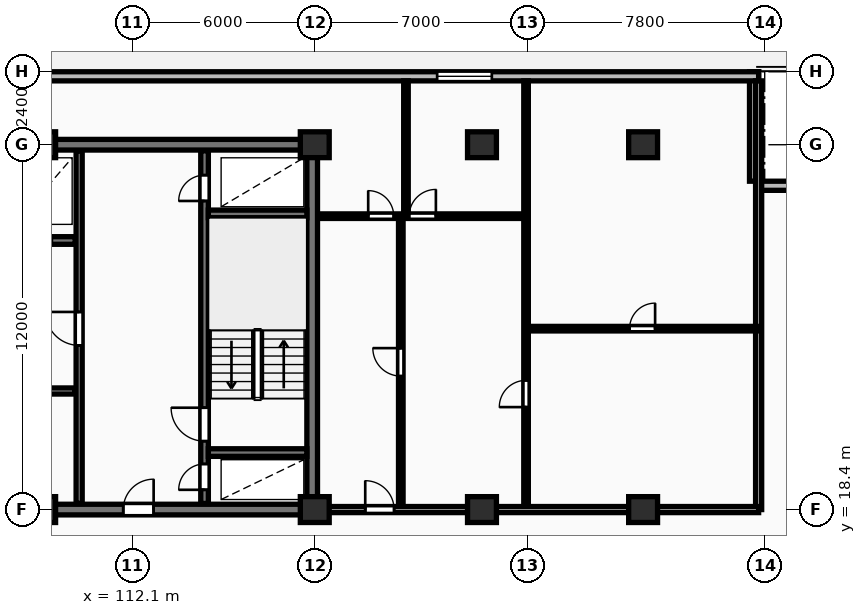
"""IFC4 building model, lengths in metres.
Left out: names, types, materials, properties, quantities, classifications, styles, units other than length and angle.
Written with IfcOpenShell. Run it as: python <this file> out.ifc"""

import sys

from ifc_helpers import new_model, si_unit, direction, frame, frame_2d, origin, origin_2d, place, context, subcontext, project, spatial, rectangle, extrude, element, fill, save


model = new_model("IFC4")
c1 = context("Model", 3, precision=1e-05, world=origin(), true_north=direction((0.0, 1.0)))
c2 = subcontext(c1, "Body", "Model", "MODEL_VIEW")
j1 = project(units=[si_unit("LENGTHUNIT", "METRE"), si_unit("PLANEANGLEUNIT", "RADIAN")], contexts=[c1])
p1 = place(None, origin())
s1 = spatial("IfcSite", under=j1, at=p1, CompositionType="ELEMENT")
p2 = place(p1, origin())
s2 = spatial("IfcBuilding", under=s1, at=p2, CompositionType="ELEMENT")
p3 = place(p2, frame((0.0, 0.0, 24.0)))
s3 = spatial("IfcBuildingStorey", under=s2, at=p3, CompositionType="ELEMENT", Elevation=24.0)
for number, where, z_axis, x_axis in (
    (1, (109.1, 18.4, 0.0), (0.0, 0.0, 1.0), (1.0, 0.0, 0.0)),
    (2, (109.1, 30.4, 0.0), (0.0, 0.0, 1.0), (1.0, 0.0, 0.0)),
    (3, (118.1, 18.4, 0.0), (0.0, 0.0, 1.0), (1.0, 0.0, 0.0)),
    (4, (118.1, 30.4, 0.0), (0.0, 0.0, 1.0), (1.0, 0.0, 0.0)),
    (5, (123.6, 18.4, 0.0), (0.0, 0.0, 1.0), (1.0, 0.0, 0.0)),
    (6, (123.6, 30.4, 0.0), (0.0, 0.0, 1.0), (1.0, 0.0, 0.0)),
    (7, (128.9, 18.4, 0.0), (0.0, 0.0, 1.0), (1.0, 0.0, 0.0)),
    (8, (128.9, 30.4, 0.0), (0.0, 0.0, 1.0), (1.0, 0.0, 0.0)),
):
    element("IfcColumn", number, at=place(p3, frame(where, z_axis=z_axis, x_axis=x_axis)), inside=s3, PredefinedType="COLUMN", context=c2, shape_type="SweptSolid", body=[
        extrude(rectangle(XDim=0.95, YDim=0.85, at=origin_2d()), origin(), (0.0, 0.0, 1.0), 3.25),
    ])
for number, where, z_axis, x_axis in (
    (9, (136.3, 29.05, 0.0), (0.0, 0.0, 1.0), (-1.0, 0.0, 0.0)),
    (10, (132.55, 29.2, 0.0), (0.0, 0.0, 1.0), (0.0, 1.0, 0.0)),
):
    element("IfcWall", number, at=place(p3, frame(where, z_axis=z_axis, x_axis=x_axis)), inside=s3, PredefinedType="STANDARD", context=c2, shape_type="SweptSolid", body=[
        extrude(rectangle(XDim=3.6, YDim=0.3, at=frame_2d((1.8, 0.0))), origin(), (0.0, 0.0, 1.0), 2.97),
    ])
p4 = place(p3, frame((132.7, 32.65, 0.0), z_axis=(0.0, 0.0, 1.0), x_axis=(-1.0, 0.0, 0.0)))
e11 = element("IfcWall", 11, at=p4, inside=s3, PredefinedType="STANDARD", context=c2, shape_type="SweptSolid", body=[
    extrude(rectangle(XDim=62.0, YDim=0.3, at=frame_2d((31.0, 0.0))), origin(), (0.0, 0.0, 1.0), 2.97),
])
p5 = place(p4, frame((52.125, 0.0, 0.85)))
e12 = element("IfcOpeningElement", 12, at=p5, cuts=e11, PredefinedType="OPENING", context=c2, shape_type="SweptSolid", body=[
    extrude(rectangle(XDim=1.8, YDim=1.8, at=frame_2d((0.9, 0.9))), frame((0.0, 0.16, 0.0), z_axis=(0.0, -1.0, 0.0), x_axis=(1.0, 0.0, 0.0)), (0.0, 0.0, 1.0), 0.32),
])
p6 = place(p4, frame((8.775, 0.0, 0.85)))
e13 = element("IfcOpeningElement", 13, at=p6, cuts=e11, PredefinedType="OPENING", context=c2, shape_type="SweptSolid", body=[
    extrude(rectangle(XDim=1.8, YDim=1.8, at=frame_2d((0.9, 0.9))), frame((0.0, 0.16, 0.0), z_axis=(0.0, -1.0, 0.0), x_axis=(1.0, 0.0, 0.0)), (0.0, 0.0, 1.0), 0.32),
])
p7 = place(p3, frame((81.925, 30.4, 0.0), z_axis=(0.0, 0.0, 1.0), x_axis=(1.0, 0.0, 0.0)))
e14 = element("IfcWall", 14, at=p7, inside=s3, PredefinedType="SHEAR", context=c2, shape_type="SweptSolid", body=[
    extrude(rectangle(XDim=36.265, YDim=0.35, at=frame_2d((18.132, 0.0))), origin(), (0.0, 0.0, 1.0), 3.25),
])
p8 = place(p3, frame((118.015, 18.575, 0.0), z_axis=(0.0, 0.0, 1.0), x_axis=(0.0, 1.0, 0.0)))
e15 = element("IfcWall", 15, at=p8, inside=s3, PredefinedType="SHEAR", context=c2, shape_type="SweptSolid", body=[
    extrude(rectangle(XDim=11.65, YDim=0.35, at=frame_2d((5.825, 0.0))), origin(), (0.0, 0.0, 1.0), 3.25),
])
p9 = place(p3, frame((81.925, 18.4, 0.0), z_axis=(0.0, 0.0, 1.0), x_axis=(1.0, 0.0, 0.0)))
e16 = element("IfcWall", 16, at=p9, inside=s3, PredefinedType="SHEAR", context=c2, shape_type="SweptSolid", body=[
    extrude(rectangle(XDim=36.265, YDim=0.35, at=frame_2d((18.132, 0.0))), origin(), (0.0, 0.0, 1.0), 3.25),
])
p10 = place(p9, frame((5.675, 0.0, 0.0)))
e17 = element("IfcOpeningElement", 17, at=p10, cuts=e16, PredefinedType="OPENING", context=c2, shape_type="SweptSolid", body=[
    extrude(rectangle(XDim=1.0, YDim=2.15, at=frame_2d((0.5, 1.075))), frame((0.0, 0.185, 0.0), z_axis=(0.0, -1.0, 0.0), x_axis=(1.0, 0.0, 0.0)), (0.0, 0.0, 1.0), 0.37),
])
p11 = place(p9, frame((21.925, 0.0, 0.0)))
e18 = element("IfcOpeningElement", 18, at=p11, cuts=e16, PredefinedType="OPENING", context=c2, shape_type="SweptSolid", body=[
    extrude(rectangle(XDim=1.5, YDim=2.2, at=frame_2d((0.75, 1.1))), frame((0.0, 0.185, 0.0), z_axis=(0.0, -1.0, 0.0), x_axis=(1.0, 0.0, 0.0)), (0.0, 0.0, 1.0), 0.37),
])
p12 = place(p9, frame((29.875, 0.0, 0.0)))
e19 = element("IfcOpeningElement", 19, at=p12, cuts=e16, PredefinedType="OPENING", context=c2, shape_type="SweptSolid", body=[
    extrude(rectangle(XDim=1.0, YDim=2.15, at=frame_2d((0.5, 1.075))), frame((0.0, 0.185, 0.0), z_axis=(0.0, -1.0, 0.0), x_axis=(1.0, 0.0, 0.0)), (0.0, 0.0, 1.0), 0.37),
])
p13 = place(p3, frame((99.68, 27.25, 0.0), z_axis=(0.0, 0.0, 1.0), x_axis=(1.0, 0.0, 0.0)))
e20 = element("IfcWall", 20, at=p13, inside=s3, PredefinedType="SHEAR", context=c2, shape_type="SweptSolid", body=[
    extrude(rectangle(XDim=10.54, YDim=0.25, at=frame_2d((5.27, 0.0))), origin(), (0.0, 0.0, 1.0), 3.25),
])
p14 = place(p13, frame((8.92, 0.0, 0.0)))
e21 = element("IfcOpeningElement", 21, at=p14, cuts=e20, PredefinedType="OPENING", context=c2, shape_type="SweptSolid", body=[
    extrude(rectangle(XDim=0.85, YDim=2.05, at=frame_2d((0.425, 1.025))), frame((0.0, 0.135, 0.0), z_axis=(0.0, -1.0, 0.0), x_axis=(1.0, 0.0, 0.0)), (0.0, 0.0, 1.0), 0.27),
])
p15 = place(p3, frame((91.08, 22.3, 0.0), z_axis=(0.0, 0.0, 1.0), x_axis=(1.0, 0.0, 0.0)))
e22 = element("IfcWall", 22, at=p15, inside=s3, PredefinedType="PARTITIONING", context=c2, shape_type="SweptSolid", body=[
    extrude(rectangle(XDim=19.14, YDim=0.2, at=frame_2d((9.57, 0.0))), origin(), (0.0, 0.0, 1.0), 2.97),
])
p16 = place(p15, frame((1.15, 0.0, 0.0)))
e23 = element("IfcOpeningElement", 23, at=p16, cuts=e22, PredefinedType="OPENING", context=c2, shape_type="SweptSolid", body=[
    extrude(rectangle(XDim=0.85, YDim=2.05, at=frame_2d((0.425, 1.025))), frame((0.0, 0.11, 0.0), z_axis=(0.0, -1.0, 0.0), x_axis=(1.0, 0.0, 0.0)), (0.0, 0.0, 1.0), 0.22),
])
p17 = place(p15, frame((3.2, 0.0, 0.0)))
e24 = element("IfcOpeningElement", 24, at=p17, cuts=e22, PredefinedType="OPENING", context=c2, shape_type="SweptSolid", body=[
    extrude(rectangle(XDim=0.85, YDim=2.05, at=frame_2d((0.425, 1.025))), frame((0.0, 0.11, 0.0), z_axis=(0.0, -1.0, 0.0), x_axis=(1.0, 0.0, 0.0)), (0.0, 0.0, 1.0), 0.22),
])
p18 = place(p15, frame((12.72, 0.0, 0.0)))
e25 = element("IfcOpeningElement", 25, at=p18, cuts=e22, PredefinedType="OPENING", context=c2, shape_type="SweptSolid", body=[
    extrude(rectangle(XDim=1.5, YDim=2.2, at=frame_2d((0.75, 1.1))), frame((0.0, 0.11, 0.0), z_axis=(0.0, -1.0, 0.0), x_axis=(1.0, 0.0, 0.0)), (0.0, 0.0, 1.0), 0.22),
])
p19 = place(p15, frame((6.42, 0.0, 0.0)))
e26 = element("IfcOpeningElement", 26, at=p19, cuts=e22, PredefinedType="OPENING", context=c2, shape_type="SweptSolid", body=[
    extrude(rectangle(XDim=0.92, YDim=2.08, at=frame_2d((0.46, 1.04))), frame((0.0, 0.11, 0.0), z_axis=(0.0, -1.0, 0.0), x_axis=(1.0, 0.0, 0.0)), (0.0, 0.0, 1.0), 0.22),
])
p20 = place(p15, frame((15.87, 0.0, 0.0)))
e27 = element("IfcOpeningElement", 27, at=p20, cuts=e22, PredefinedType="OPENING", context=c2, shape_type="SweptSolid", body=[
    extrude(rectangle(XDim=0.92, YDim=2.08, at=frame_2d((0.46, 1.04))), frame((0.0, 0.11, 0.0), z_axis=(0.0, -1.0, 0.0), x_axis=(1.0, 0.0, 0.0)), (0.0, 0.0, 1.0), 0.22),
])
p21 = place(p3, frame((110.35, 18.6, 0.0), z_axis=(0.0, 0.0, 1.0), x_axis=(0.0, 1.0, 0.0)))
e28 = element("IfcWall", 28, at=p21, inside=s3, PredefinedType="PARTITIONING", context=c2, shape_type="SweptSolid", body=[
    extrude(rectangle(XDim=11.6, YDim=0.2, at=frame_2d((5.8, 0.0))), origin(), (0.0, 0.0, 1.0), 2.97),
])
p22 = place(p21, frame((5.2, 0.0, 0.0)))
e29 = element("IfcOpeningElement", 29, at=p22, cuts=e28, PredefinedType="OPENING", context=c2, shape_type="SweptSolid", body=[
    extrude(rectangle(XDim=1.1, YDim=2.15, at=frame_2d((0.55, 1.075))), frame((0.0, 0.11, 0.0), z_axis=(0.0, -1.0, 0.0), x_axis=(1.0, 0.0, 0.0)), (0.0, 0.0, 1.0), 0.22),
])
p23 = place(p3, frame((114.475, 18.6, 0.0), z_axis=(0.0, 0.0, 1.0), x_axis=(0.0, 1.0, 0.0)))
e30 = element("IfcWall", 30, at=p23, inside=s3, PredefinedType="SHEAR", context=c2, shape_type="SweptSolid", body=[
    extrude(rectangle(XDim=11.6, YDim=0.25, at=frame_2d((5.8, 0.0))), origin(), (0.0, 0.0, 1.0), 3.25),
])
p24 = place(p23, frame((0.45, 0.0, 0.0)))
e31 = element("IfcOpeningElement", 31, at=p24, cuts=e30, PredefinedType="OPENING", context=c2, shape_type="SweptSolid", body=[
    extrude(rectangle(XDim=0.85, YDim=2.05, at=frame_2d((0.425, 1.025))), frame((0.0, 0.135, 0.0), z_axis=(0.0, -1.0, 0.0), x_axis=(1.0, 0.0, 0.0)), (0.0, 0.0, 1.0), 0.27),
])
p25 = place(p23, frame((2.05, 0.0, 0.0)))
e32 = element("IfcOpeningElement", 32, at=p25, cuts=e30, PredefinedType="OPENING", context=c2, shape_type="SweptSolid", body=[
    extrude(rectangle(XDim=1.1, YDim=2.1, at=frame_2d((0.55, 1.05))), frame((0.0, 0.135, 0.0), z_axis=(0.0, -1.0, 0.0), x_axis=(1.0, 0.0, 0.0)), (0.0, 0.0, 1.0), 0.27),
])
p26 = place(p23, frame((9.95, 0.0, 0.0)))
e33 = element("IfcOpeningElement", 33, at=p26, cuts=e30, PredefinedType="OPENING", context=c2, shape_type="SweptSolid", body=[
    extrude(rectangle(XDim=0.85, YDim=2.05, at=frame_2d((0.425, 1.025))), frame((0.0, 0.135, 0.0), z_axis=(0.0, -1.0, 0.0), x_axis=(1.0, 0.0, 0.0)), (0.0, 0.0, 1.0), 0.27),
])
for number, where, z_axis, x_axis in (
    (34, (114.6, 20.275, 0.0), (0.0, 0.0, 1.0), (1.0, 0.0, 0.0)),
    (35, (114.6, 28.125, 0.0), (0.0, 0.0, 1.0), (1.0, 0.0, 0.0)),
):
    element("IfcWall", number, at=place(p3, frame(where, z_axis=z_axis, x_axis=x_axis)), inside=s3, PredefinedType="SHEAR", context=c2, shape_type="SweptSolid", body=[
        extrude(rectangle(XDim=3.24, YDim=0.25, at=frame_2d((1.62, 0.0))), origin(), (0.0, 0.0, 1.0), 3.25),
    ])
p27 = place(p3, frame((132.7, 18.4, 0.0), z_axis=(0.0, 0.0, 1.0), x_axis=(0.0, 1.0, 0.0)))
e36 = element("IfcWall", 36, at=p27, inside=s3, PredefinedType="PARTITIONING", context=c2, shape_type="SweptSolid", body=[
    extrude(rectangle(XDim=14.1, YDim=0.2, at=frame_2d((7.05, 0.0))), origin(), (0.0, 0.0, 1.0), 2.97),
])
p28 = place(p3, frame((125.05, 24.35, 0.0), z_axis=(0.0, 0.0, 1.0), x_axis=(1.0, 0.0, 0.0)))
e37 = element("IfcWall", 37, at=p28, inside=s3, PredefinedType="PARTITIONING", context=c2, shape_type="SweptSolid", body=[
    extrude(rectangle(XDim=7.65, YDim=0.15, at=frame_2d((3.825, 0.0))), origin(), (0.0, 0.0, 1.0), 2.97),
])
p29 = place(p28, frame((3.405, 0.0, 0.0)))
e38 = element("IfcOpeningElement", 38, at=p29, cuts=e37, PredefinedType="OPENING", context=c2, shape_type="SweptSolid", body=[
    extrude(rectangle(XDim=0.84, YDim=2.04, at=frame_2d((0.42, 1.02))), frame((0.0, 0.085, 0.0), z_axis=(0.0, -1.0, 0.0), x_axis=(1.0, 0.0, 0.0)), (0.0, 0.0, 1.0), 0.17),
])
p30 = place(p3, frame((125.05, 18.45, 0.0), z_axis=(0.0, 0.0, 1.0), x_axis=(0.0, 1.0, 0.0)))
e39 = element("IfcWall", 39, at=p30, inside=s3, PredefinedType="PARTITIONING", context=c2, shape_type="SweptSolid", body=[
    extrude(rectangle(XDim=14.05, YDim=0.15, at=frame_2d((7.025, 0.0))), origin(), (0.0, 0.0, 1.0), 2.97),
])
p31 = place(p30, frame((3.32, 0.0, 0.0)))
e40 = element("IfcOpeningElement", 40, at=p31, cuts=e39, PredefinedType="OPENING", context=c2, shape_type="SweptSolid", body=[
    extrude(rectangle(XDim=0.88, YDim=2.06, at=frame_2d((0.44, 1.03))), frame((0.0, 0.085, 0.0), z_axis=(0.0, -1.0, 0.0), x_axis=(1.0, 0.0, 0.0)), (0.0, 0.0, 1.0), 0.17),
])
p32 = place(p3, frame((120.93, 18.45, 0.0), z_axis=(0.0, 0.0, 1.0), x_axis=(0.0, 1.0, 0.0)))
e41 = element("IfcWall", 41, at=p32, inside=s3, PredefinedType="PARTITIONING", context=c2, shape_type="SweptSolid", body=[
    extrude(rectangle(XDim=9.6, YDim=0.15, at=frame_2d((4.8, 0.0))), origin(), (0.0, 0.0, 1.0), 2.97),
])
p33 = place(p32, frame((4.34, 0.0, 0.0)))
e42 = element("IfcOpeningElement", 42, at=p33, cuts=e41, PredefinedType="OPENING", context=c2, shape_type="SweptSolid", body=[
    extrude(rectangle(XDim=0.92, YDim=2.08, at=frame_2d((0.46, 1.04))), frame((0.0, 0.085, 0.0), z_axis=(0.0, -1.0, 0.0), x_axis=(1.0, 0.0, 0.0)), (0.0, 0.0, 1.0), 0.17),
])
p34 = place(p3, frame((121.1, 28.05, 0.0), z_axis=(0.0, 0.0, 1.0), x_axis=(0.0, 1.0, 0.0)))
e43 = element("IfcWall", 43, at=p34, inside=s3, PredefinedType="PARTITIONING", context=c2, shape_type="SweptSolid", body=[
    extrude(rectangle(XDim=4.45, YDim=0.15, at=frame_2d((2.225, 0.0))), origin(), (0.0, 0.0, 1.0), 2.97),
])
p35 = place(p3, frame((118.27, 28.05, 0.0), z_axis=(0.0, 0.0, 1.0), x_axis=(1.0, 0.0, 0.0)))
e44 = element("IfcWall", 44, at=p35, inside=s3, PredefinedType="PARTITIONING", context=c2, shape_type="SweptSolid", body=[
    extrude(rectangle(XDim=6.76, YDim=0.15, at=frame_2d((3.38, 0.0))), origin(), (0.0, 0.0, 1.0), 2.97),
])
p36 = place(p35, frame((1.587, 0.0, 0.0)))
e45 = element("IfcOpeningElement", 45, at=p36, cuts=e44, PredefinedType="OPENING", context=c2, shape_type="SweptSolid", body=[
    extrude(rectangle(XDim=0.84, YDim=2.04, at=frame_2d((0.42, 1.02))), frame((0.0, 0.085, 0.0), z_axis=(0.0, -1.0, 0.0), x_axis=(1.0, 0.0, 0.0)), (0.0, 0.0, 1.0), 0.17),
])
p37 = place(p35, frame((2.934, 0.0, 0.0)))
e46 = element("IfcOpeningElement", 46, at=p37, cuts=e44, PredefinedType="OPENING", context=c2, shape_type="SweptSolid", body=[
    extrude(rectangle(XDim=0.88, YDim=2.06, at=frame_2d((0.44, 1.03))), frame((0.0, 0.085, 0.0), z_axis=(0.0, -1.0, 0.0), x_axis=(1.0, 0.0, 0.0)), (0.0, 0.0, 1.0), 0.17),
])
p38 = place(p3, frame((118.25, 18.4, 0.0), z_axis=(0.0, 0.0, 1.0), x_axis=(1.0, 0.0, 0.0)))
e47 = element("IfcWall", 47, at=p38, inside=s3, PredefinedType="PARTITIONING", context=c2, shape_type="SweptSolid", body=[
    extrude(rectangle(XDim=14.45, YDim=0.2, at=frame_2d((7.225, 0.0))), origin(), (0.0, 0.0, 1.0), 2.37),
])
p39 = place(p38, frame((1.51, 0.0, 0.0)))
e48 = element("IfcOpeningElement", 48, at=p39, cuts=e47, PredefinedType="OPENING", context=c2, shape_type="SweptSolid", body=[
    extrude(rectangle(XDim=0.95, YDim=2.15, at=frame_2d((0.475, 1.075))), frame((0.0, 0.11, 0.0), z_axis=(0.0, -1.0, 0.0), x_axis=(1.0, 0.0, 0.0)), (0.0, 0.0, 1.0), 0.22),
])
p40 = place(p6, origin())
e49 = element("IfcWindow", 49, at=p40, inside=s3, PartitioningType="SINGLE_PANEL", PredefinedType="WINDOW", context=c2, shape_type="SweptSolid", body=[
    extrude(rectangle(XDim=1.8, YDim=1.8, at=frame_2d((0.9, 0.9))), frame((0.0, 0.03, 0.0), z_axis=(0.0, -1.0, 0.0), x_axis=(1.0, 0.0, 0.0)), (0.0, 0.0, 1.0), 0.06),
])
fill(e13, e49)
p41 = place(p12, origin())
e50 = element("IfcDoor", 50, at=p41, inside=s3, OperationType="SINGLE_SWING_RIGHT", PredefinedType="DOOR", context=c2, shape_type="SweptSolid", body=[
    extrude(rectangle(XDim=1.0, YDim=2.15, at=frame_2d((0.5, 1.075))), frame((0.0, 0.025, 0.0), z_axis=(0.0, -1.0, 0.0), x_axis=(1.0, 0.0, 0.0)), (0.0, 0.0, 1.0), 0.05),
])
fill(e19, e50)
p42 = place(p22, origin())
e51 = element("IfcDoor", 51, at=p42, inside=s3, OperationType="SINGLE_SWING_RIGHT", PredefinedType="DOOR", context=c2, shape_type="SweptSolid", body=[
    extrude(rectangle(XDim=1.1, YDim=2.15, at=frame_2d((0.55, 1.075))), frame((0.0, 0.025, 0.0), z_axis=(0.0, -1.0, 0.0), x_axis=(1.0, 0.0, 0.0)), (0.0, 0.0, 1.0), 0.05),
])
fill(e29, e51)
p43 = place(p24, origin())
e52 = element("IfcDoor", 52, at=p43, inside=s3, OperationType="SINGLE_SWING_LEFT", PredefinedType="DOOR", context=c2, shape_type="SweptSolid", body=[
    extrude(rectangle(XDim=0.85, YDim=2.05, at=frame_2d((0.425, 1.025))), frame((0.0, 0.025, 0.0), z_axis=(0.0, -1.0, 0.0), x_axis=(1.0, 0.0, 0.0)), (0.0, 0.0, 1.0), 0.05),
])
fill(e31, e52)
p44 = place(p25, origin())
e53 = element("IfcDoor", 53, at=p44, inside=s3, OperationType="SINGLE_SWING_RIGHT", PredefinedType="DOOR", context=c2, shape_type="SweptSolid", body=[
    extrude(rectangle(XDim=1.1, YDim=2.1, at=frame_2d((0.55, 1.05))), frame((0.0, 0.025, 0.0), z_axis=(0.0, -1.0, 0.0), x_axis=(1.0, 0.0, 0.0)), (0.0, 0.0, 1.0), 0.05),
])
fill(e32, e53)
p45 = place(p26, origin())
e54 = element("IfcDoor", 54, at=p45, inside=s3, OperationType="SINGLE_SWING_LEFT", PredefinedType="DOOR", context=c2, shape_type="SweptSolid", body=[
    extrude(rectangle(XDim=0.85, YDim=2.05, at=frame_2d((0.425, 1.025))), frame((0.0, 0.025, 0.0), z_axis=(0.0, -1.0, 0.0), x_axis=(1.0, 0.0, 0.0)), (0.0, 0.0, 1.0), 0.05),
])
fill(e33, e54)
p46 = place(p29, origin())
e55 = element("IfcDoor", 55, at=p46, inside=s3, OperationType="SINGLE_SWING_RIGHT", PredefinedType="DOOR", context=c2, shape_type="SweptSolid", body=[
    extrude(rectangle(XDim=0.84, YDim=2.04, at=frame_2d((0.42, 1.02))), frame((0.0, 0.025, 0.0), z_axis=(0.0, -1.0, 0.0), x_axis=(1.0, 0.0, 0.0)), (0.0, 0.0, 1.0), 0.05),
])
fill(e38, e55)
p47 = place(p31, origin())
e56 = element("IfcDoor", 56, at=p47, inside=s3, OperationType="SINGLE_SWING_LEFT", PredefinedType="DOOR", context=c2, shape_type="SweptSolid", body=[
    extrude(rectangle(XDim=0.88, YDim=2.06, at=frame_2d((0.44, 1.03))), frame((0.0, 0.025, 0.0), z_axis=(0.0, -1.0, 0.0), x_axis=(1.0, 0.0, 0.0)), (0.0, 0.0, 1.0), 0.05),
])
fill(e40, e56)
p48 = place(p33, origin())
e57 = element("IfcDoor", 57, at=p48, inside=s3, OperationType="SINGLE_SWING_RIGHT", PredefinedType="DOOR", context=c2, shape_type="SweptSolid", body=[
    extrude(rectangle(XDim=0.92, YDim=2.08, at=frame_2d((0.46, 1.04))), frame((0.0, 0.025, 0.0), z_axis=(0.0, -1.0, 0.0), x_axis=(1.0, 0.0, 0.0)), (0.0, 0.0, 1.0), 0.05),
])
fill(e42, e57)
p49 = place(p36, origin())
e58 = element("IfcDoor", 58, at=p49, inside=s3, OperationType="SINGLE_SWING_LEFT", PredefinedType="DOOR", context=c2, shape_type="SweptSolid", body=[
    extrude(rectangle(XDim=0.84, YDim=2.04, at=frame_2d((0.42, 1.02))), frame((0.0, 0.025, 0.0), z_axis=(0.0, -1.0, 0.0), x_axis=(1.0, 0.0, 0.0)), (0.0, 0.0, 1.0), 0.05),
])
fill(e45, e58)
p50 = place(p37, origin())
e59 = element("IfcDoor", 59, at=p50, inside=s3, OperationType="SINGLE_SWING_RIGHT", PredefinedType="DOOR", context=c2, shape_type="SweptSolid", body=[
    extrude(rectangle(XDim=0.88, YDim=2.06, at=frame_2d((0.44, 1.03))), frame((0.0, 0.025, 0.0), z_axis=(0.0, -1.0, 0.0), x_axis=(1.0, 0.0, 0.0)), (0.0, 0.0, 1.0), 0.05),
])
fill(e46, e59)
p51 = place(p39, origin())
e60 = element("IfcDoor", 60, at=p51, inside=s3, OperationType="SINGLE_SWING_LEFT", PredefinedType="DOOR", context=c2, shape_type="SweptSolid", body=[
    extrude(rectangle(XDim=0.95, YDim=2.15, at=frame_2d((0.475, 1.075))), frame((0.0, 0.025, 0.0), z_axis=(0.0, -1.0, 0.0), x_axis=(1.0, 0.0, 0.0)), (0.0, 0.0, 1.0), 0.05),
])
fill(e48, e60)
save(model, sys.argv[1])
